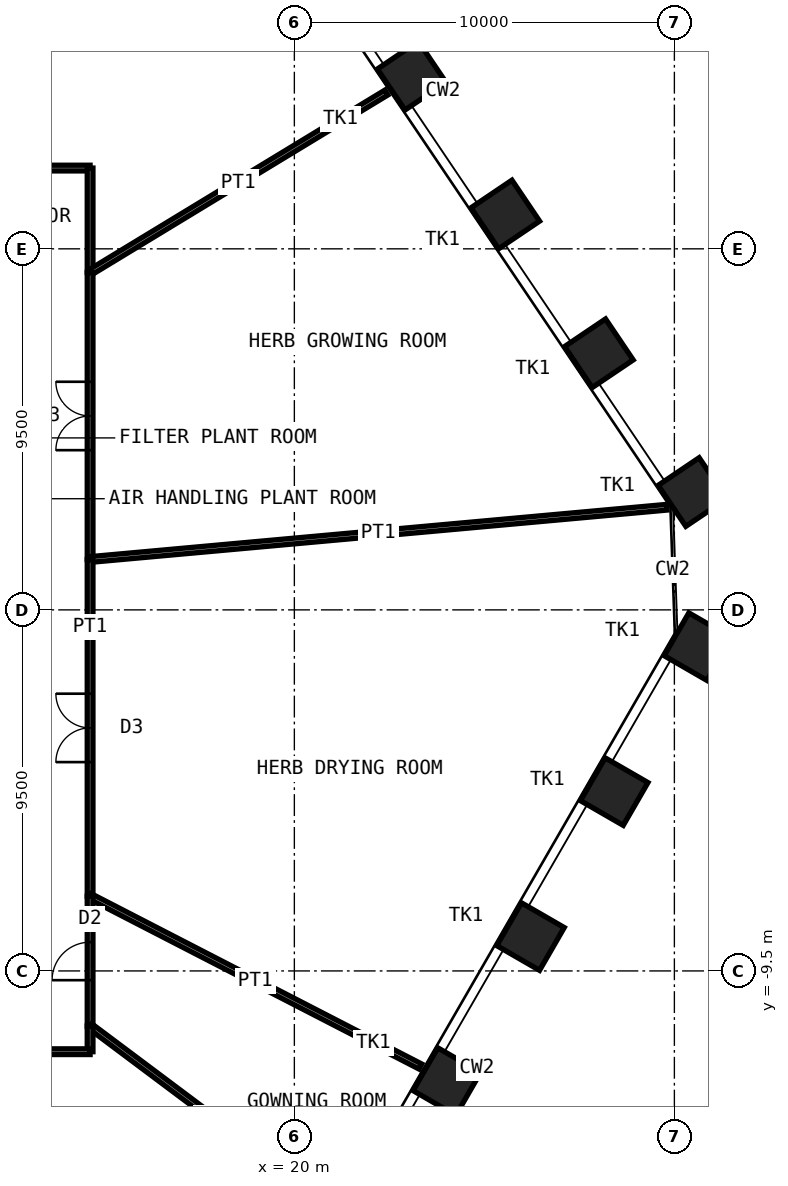
"""IFC4 building model, lengths in metres.
Left out: names, types, materials, properties, quantities, classifications, styles, units other than length and angle.
Written with IfcOpenShell. Run it as: python <this file> out.ifc"""

import sys

from ifc_helpers import new_model, si_unit, direction, frame, frame_2d, origin, origin_2d, place, context, subcontext, project, spatial, rectangle, hollow_rectangle, extrude, element, fill, save


model = new_model("IFC4")
c1 = context("Model", 3, precision=1e-05, world=origin(), true_north=direction((0.0, 1.0)))
c2 = subcontext(c1, "Body", "Model", "MODEL_VIEW")
j1 = project(units=[si_unit("LENGTHUNIT", "METRE"), si_unit("PLANEANGLEUNIT", "RADIAN")], contexts=[c1])
p1 = place(None, origin())
s1 = spatial("IfcSite", under=j1, at=p1, CompositionType="ELEMENT")
p2 = place(p1, origin())
s2 = spatial("IfcBuilding", under=s1, at=p2, CompositionType="ELEMENT")
p3 = place(p2, frame((0.0, 0.0, 92.0)))
s3 = spatial("IfcBuildingStorey", under=s2, at=p3, CompositionType="ELEMENT", Elevation=92.0)
for number, where, z_axis, x_axis in (
    (1, (23.087, 14.056, 0.0), (0.0, 0.0, 1.0), (-0.559, 0.829, 0.0)),
    (2, (25.55, 10.404, 0.0), (0.0, 0.0, 1.0), (-0.559, 0.829, 0.0)),
    (3, (28.013, 6.752, 0.0), (0.0, 0.0, 1.0), (-0.559, 0.829, 0.0)),
    (4, (30.476, 3.101, 0.0), (0.0, 0.0, 1.0), (-0.559, 0.829, 0.0)),
    (5, (30.618, -0.967, 0.0), (0.0, 0.0, 1.0), (0.5, 0.866, 0.0)),
    (6, (28.416, -4.782, 0.0), (0.0, 0.0, 1.0), (0.5, 0.866, 0.0)),
    (7, (26.214, -8.596, 0.0), (0.0, 0.0, 1.0), (0.5, 0.866, 0.0)),
    (8, (24.011, -12.411, 0.0), (0.0, 0.0, 1.0), (0.5, 0.866, 0.0)),
):
    element("IfcColumn", number, at=place(p3, frame(where, z_axis=z_axis, x_axis=x_axis)), inside=s3, PredefinedType="COLUMN", context=c2, shape_type="SweptSolid", body=[
        extrude(hollow_rectangle(XDim=1.3, YDim=1.3, WallThickness=0.1, at=origin_2d()), origin(), (0.0, 0.0, 1.0), 5.0),
    ])
p4 = place(p3, frame((1.391, 11.625, 0.0), z_axis=(0.0, 0.0, 1.0), x_axis=(1.0, 0.0, 0.0)))
e9 = element("IfcWall", 9, at=p4, inside=s3, PredefinedType="PARTITIONING", context=c2, shape_type="SweptSolid", body=[
    extrude(rectangle(XDim=13.234, YDim=0.15, at=frame_2d((6.617, 0.0))), origin(), (0.0, 0.0, 1.0), 4.72),
])
p5 = place(p4, frame((5.717, 0.0, 0.0)))
e10 = element("IfcOpeningElement", 10, at=p5, cuts=e9, PredefinedType="OPENING", context=c2, shape_type="SweptSolid", body=[
    extrude(rectangle(XDim=1.8, YDim=2.4, at=frame_2d((0.9, 1.2))), frame((0.0, 0.085, 0.0), z_axis=(0.0, -1.0, 0.0), x_axis=(1.0, 0.0, 0.0)), (0.0, 0.0, 1.0), 0.17),
])
p6 = place(p3, frame((14.625, 11.625, 0.0), z_axis=(0.0, 0.0, 1.0), x_axis=(0.0, -1.0, 0.0)))
e11 = element("IfcWall", 11, at=p6, inside=s3, PredefinedType="PARTITIONING", context=c2, shape_type="SweptSolid", body=[
    extrude(rectangle(XDim=2.746, YDim=0.15, at=frame_2d((1.373, 0.0))), origin(), (0.0, 0.0, 1.0), 4.72),
])
p7 = place(p3, frame((22.421, 13.612, 0.0), z_axis=(0.0, 0.0, 1.0), x_axis=(-0.854793452413, -0.518968355213, 0.0)))
e12 = element("IfcWall", 12, at=p7, inside=s3, PredefinedType="PARTITIONING", context=c2, shape_type="SweptSolid", body=[
    extrude(rectangle(XDim=9.121, YDim=0.15, at=frame_2d((4.561, 0.0))), origin(), (0.0, 0.0, 1.0), 3.82),
])
p8 = place(p3, frame((14.625, 8.879, 0.0), z_axis=(0.0, 0.0, 1.0), x_axis=(0.0, -1.0, 0.0)))
e13 = element("IfcWall", 13, at=p8, inside=s3, PredefinedType="PARTITIONING", context=c2, shape_type="SweptSolid", body=[
    extrude(rectangle(XDim=7.553, YDim=0.15, at=frame_2d((3.777, 0.0))), origin(), (0.0, 0.0, 1.0), 4.72),
])
p9 = place(p8, frame((2.877, 0.0, 0.0)))
e14 = element("IfcOpeningElement", 14, at=p9, cuts=e13, PredefinedType="OPENING", context=c2, shape_type="SweptSolid", body=[
    extrude(rectangle(XDim=1.8, YDim=2.4, at=frame_2d((0.9, 1.2))), frame((0.0, 0.085, 0.0), z_axis=(0.0, -1.0, 0.0), x_axis=(1.0, 0.0, 0.0)), (0.0, 0.0, 1.0), 0.17),
])
p10 = place(p3, frame((29.796, 2.7, 0.0), z_axis=(0.0, 0.0, 1.0), x_axis=(-0.99591812791, -0.090261190441, 0.0)))
e15 = element("IfcWall", 15, at=p10, inside=s3, PredefinedType="PARTITIONING", context=c2, shape_type="SweptSolid", body=[
    extrude(rectangle(XDim=15.234, YDim=0.15, at=frame_2d((7.617, 0.0))), origin(), (0.0, 0.0, 1.0), 3.52),
])
p11 = place(p3, frame((14.625, 1.325, 0.0), z_axis=(0.0, 0.0, 1.0), x_axis=(0.0, -1.0, 0.0)))
e16 = element("IfcWall", 16, at=p11, inside=s3, PredefinedType="PARTITIONING", context=c2, shape_type="SweptSolid", body=[
    extrude(rectangle(XDim=8.862, YDim=0.15, at=frame_2d((4.431, 0.0))), origin(), (0.0, 0.0, 1.0), 4.72),
])
p12 = place(p11, frame((3.531, 0.0, 0.0)))
e17 = element("IfcOpeningElement", 17, at=p12, cuts=e16, PredefinedType="OPENING", context=c2, shape_type="SweptSolid", body=[
    extrude(rectangle(XDim=1.8, YDim=2.4, at=frame_2d((0.9, 1.2))), frame((0.0, 0.085, 0.0), z_axis=(0.0, -1.0, 0.0), x_axis=(1.0, 0.0, 0.0)), (0.0, 0.0, 1.0), 0.17),
])
p13 = place(p3, frame((23.316, -12.015, 0.0), z_axis=(0.0, 0.0, 1.0), x_axis=(-0.888917561609, 0.458067209767, 0.0)))
e18 = element("IfcWall", 18, at=p13, inside=s3, PredefinedType="PARTITIONING", context=c2, shape_type="SweptSolid", body=[
    extrude(rectangle(XDim=9.778, YDim=0.15, at=frame_2d((4.889, 0.0))), origin(), (0.0, 0.0, 1.0), 3.52),
])
p14 = place(p3, frame((14.625, -7.536, 0.0), z_axis=(0.0, 0.0, 1.0), x_axis=(0.0, -1.0, 0.0)))
e19 = element("IfcWall", 19, at=p14, inside=s3, PredefinedType="PARTITIONING", context=c2, shape_type="SweptSolid", body=[
    extrude(rectangle(XDim=3.414, YDim=0.15, at=frame_2d((1.707, 0.0))), origin(), (0.0, 0.0, 1.0), 4.72),
])
p15 = place(p14, frame((1.207, 0.0, 0.0)))
e20 = element("IfcOpeningElement", 20, at=p15, cuts=e19, PredefinedType="OPENING", context=c2, shape_type="SweptSolid", body=[
    extrude(rectangle(XDim=1.0, YDim=2.4, at=frame_2d((0.5, 1.2))), frame((0.0, 0.085, 0.0), z_axis=(0.0, -1.0, 0.0), x_axis=(1.0, 0.0, 0.0)), (0.0, 0.0, 1.0), 0.17),
])
p16 = place(p3, frame((21.123, -15.815, 0.0), z_axis=(0.0, 0.0, 1.0), x_axis=(-0.800490565123, 0.599345355492, 0.0)))
e21 = element("IfcWall", 21, at=p16, inside=s3, PredefinedType="PARTITIONING", context=c2, shape_type="SweptSolid", body=[
    extrude(rectangle(XDim=8.118, YDim=0.15, at=frame_2d((4.059, 0.0))), origin(), (0.0, 0.0, 1.0), 3.82),
])
p17 = place(p3, frame((14.625, -10.95, 0.0), z_axis=(0.0, 0.0, 1.0), x_axis=(0.0, -1.0, 0.0)))
e22 = element("IfcWall", 22, at=p17, inside=s3, PredefinedType="PARTITIONING", context=c2, shape_type="SweptSolid", body=[
    extrude(rectangle(XDim=0.675, YDim=0.15, at=frame_2d((0.337, 0.0))), origin(), (0.0, 0.0, 1.0), 4.72),
])
p18 = place(p3, frame((14.625, -11.625, 0.0), z_axis=(0.0, 0.0, 1.0), x_axis=(-1.0, 0.0, 0.0)))
e23 = element("IfcWall", 23, at=p18, inside=s3, PredefinedType="PARTITIONING", context=c2, shape_type="SweptSolid", body=[
    extrude(rectangle(XDim=6.317, YDim=0.15, at=frame_2d((3.158, 0.0))), origin(), (0.0, 0.0, 1.0), 4.72),
])
p19 = place(p18, frame((2.658, 0.0, 0.0)))
e24 = element("IfcOpeningElement", 24, at=p19, cuts=e23, PredefinedType="OPENING", context=c2, shape_type="SweptSolid", body=[
    extrude(rectangle(XDim=1.0, YDim=2.4, at=frame_2d((0.5, 1.2))), frame((0.0, 0.085, 0.0), z_axis=(0.0, -1.0, 0.0), x_axis=(1.0, 0.0, 0.0)), (0.0, 0.0, 1.0), 0.17),
])
p20 = place(p3, frame((16.74, -23.423, 0.0), z_axis=(0.0, 0.0, 1.0), x_axis=(-0.581451576506, 0.813581012671, 0.0)))
e25 = element("IfcWall", 25, at=p20, inside=s3, PredefinedType="PARTITIONING", context=c2, shape_type="SweptSolid", body=[
    extrude(rectangle(XDim=14.501, YDim=0.15, at=frame_2d((7.251, 0.0))), origin(), (0.0, 0.0, 1.0), 3.82),
])
p21 = place(p9, origin())
e26 = element("IfcDoor", 26, at=p21, inside=s3, OperationType="DOUBLE_DOOR_DOUBLE_SWING", PredefinedType="DOOR", context=c2, shape_type="SweptSolid", body=[
    extrude(rectangle(XDim=1.8, YDim=2.4, at=frame_2d((0.9, 1.2))), frame((0.0, 0.025, 0.0), z_axis=(0.0, -1.0, 0.0), x_axis=(1.0, 0.0, 0.0)), (0.0, 0.0, 1.0), 0.05),
])
fill(e14, e26)
p22 = place(p12, origin())
e27 = element("IfcDoor", 27, at=p22, inside=s3, OperationType="DOUBLE_DOOR_DOUBLE_SWING", PredefinedType="DOOR", context=c2, shape_type="SweptSolid", body=[
    extrude(rectangle(XDim=1.8, YDim=2.4, at=frame_2d((0.9, 1.2))), frame((0.0, 0.025, 0.0), z_axis=(0.0, -1.0, 0.0), x_axis=(1.0, 0.0, 0.0)), (0.0, 0.0, 1.0), 0.05),
])
fill(e17, e27)
p23 = place(p15, origin())
e28 = element("IfcDoor", 28, at=p23, inside=s3, OperationType="SINGLE_SWING_RIGHT", PredefinedType="DOOR", context=c2, shape_type="SweptSolid", body=[
    extrude(rectangle(XDim=1.0, YDim=2.4, at=frame_2d((0.5, 1.2))), frame((0.0, 0.025, 0.0), z_axis=(0.0, -1.0, 0.0), x_axis=(1.0, 0.0, 0.0)), (0.0, 0.0, 1.0), 0.05),
])
fill(e20, e28)
save(model, sys.argv[1])
